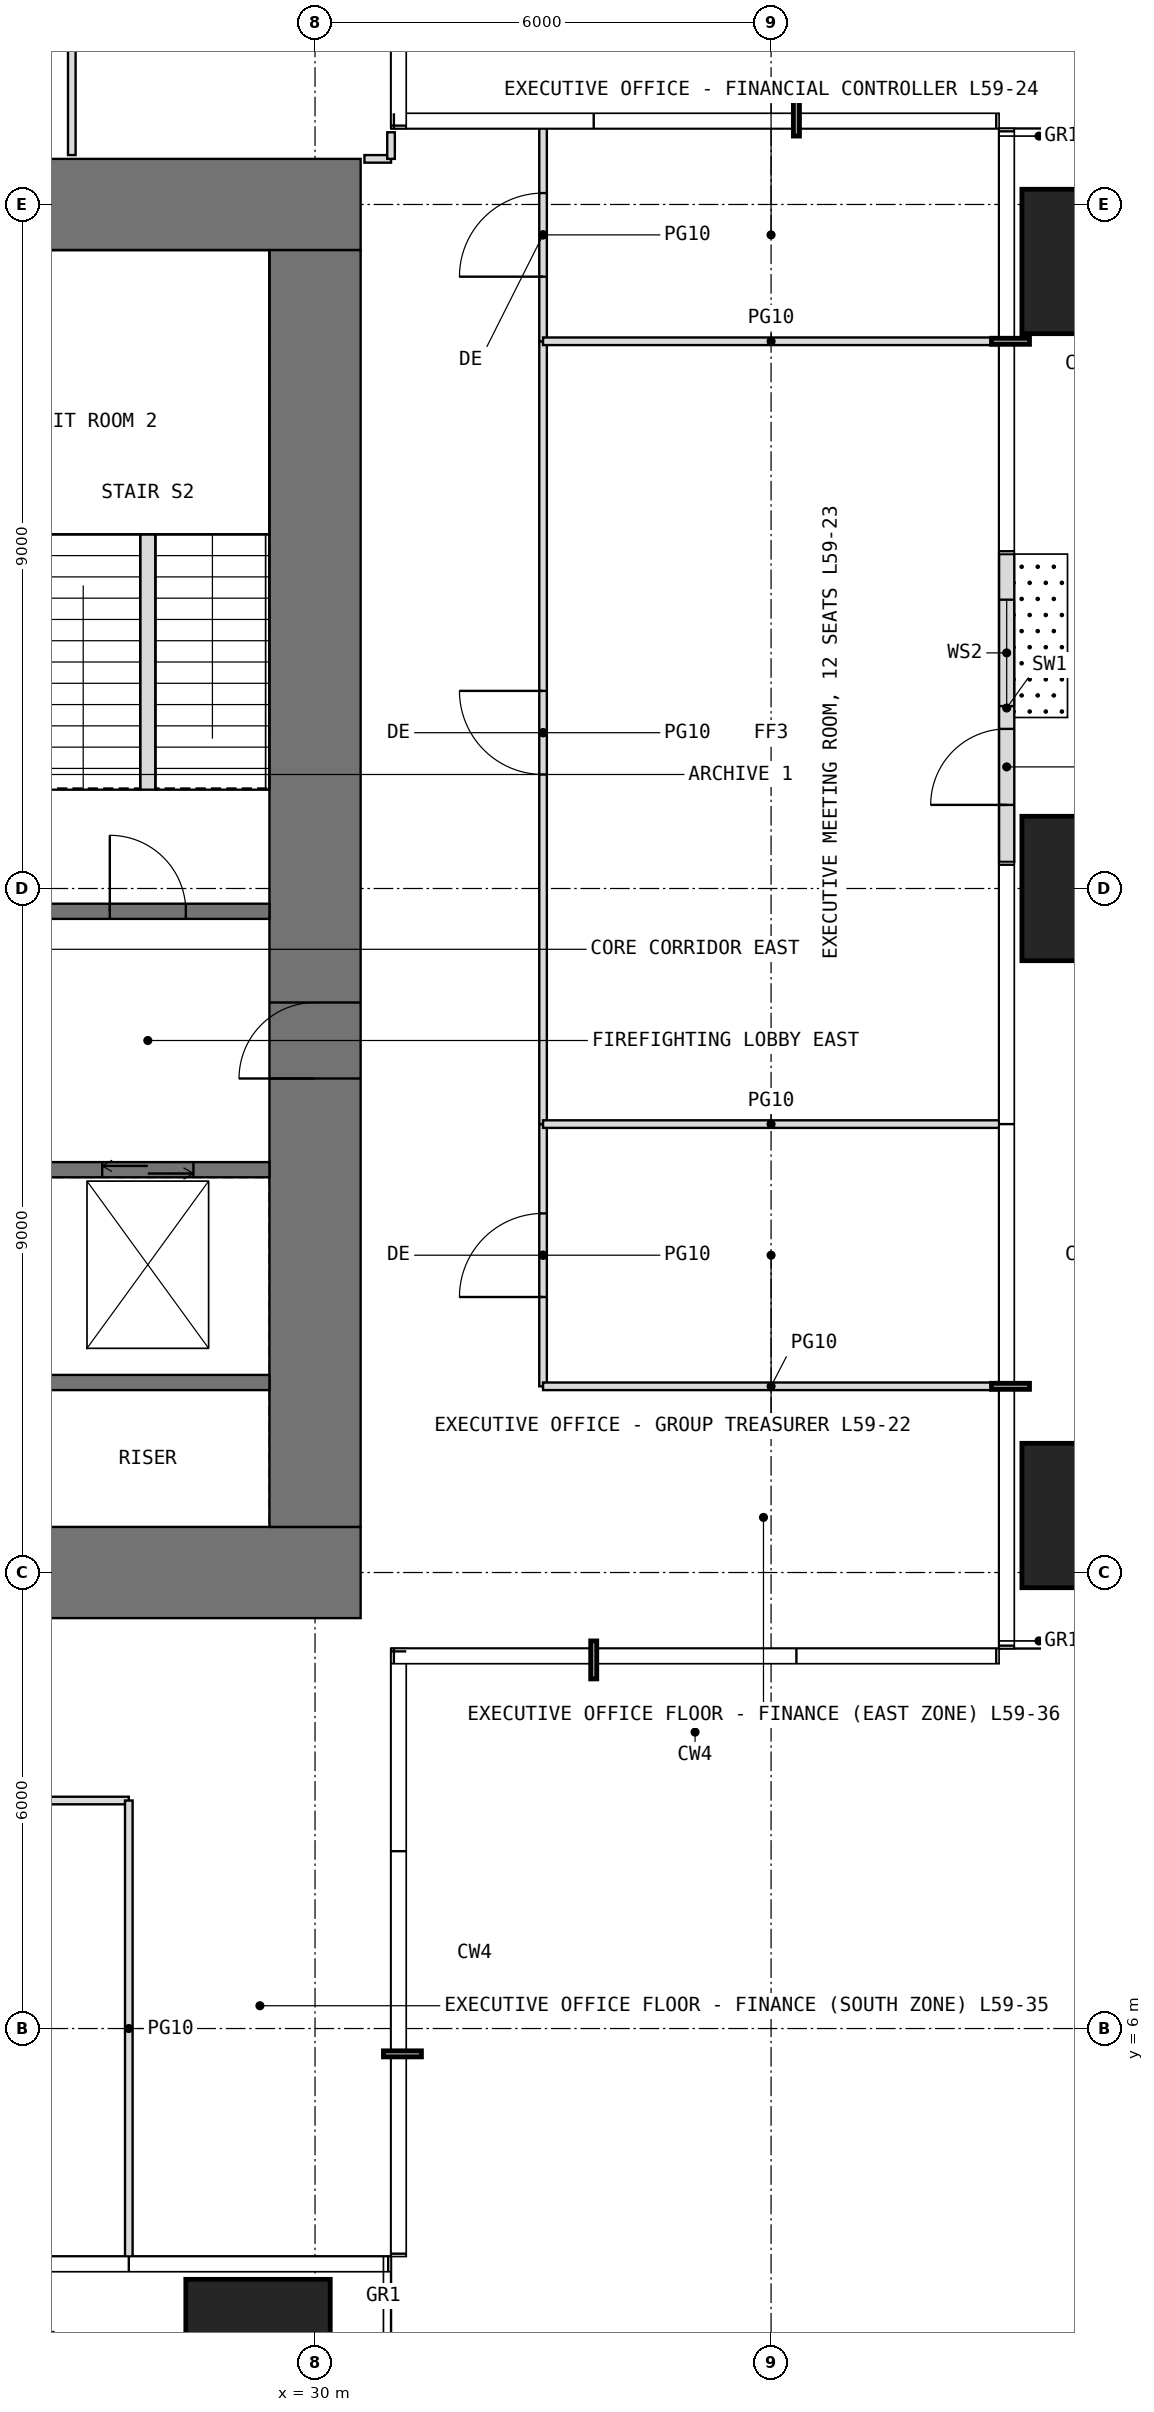
"""IFC4 building model, lengths in metres.
Left out: names, types, materials, properties, quantities, classifications, styles, units other than length and angle.
Written with IfcOpenShell. Run it as: python <this file> out.ifc"""

import sys

from ifc_helpers import new_model, si_unit, direction, frame, frame_2d, origin, origin_2d, place, context, subcontext, project, spatial, rectangle, extrude, element, fill, save


model = new_model("IFC4")
c1 = context("Model", 3, precision=1e-05, world=origin(), true_north=direction((0.0, 1.0)))
c2 = subcontext(c1, "Body", "Model", "MODEL_VIEW")
j1 = project(units=[si_unit("LENGTHUNIT", "METRE"), si_unit("PLANEANGLEUNIT", "RADIAN")], contexts=[c1])
p1 = place(None, origin())
s1 = spatial("IfcSite", under=j1, at=p1, CompositionType="ELEMENT")
p2 = place(p1, origin())
s2 = spatial("IfcBuilding", under=s1, at=p2, CompositionType="ELEMENT")
p3 = place(p2, frame((0.0, 0.0, 248.2)))
s3 = spatial("IfcBuildingStorey", under=s2, at=p3, CompositionType="ELEMENT", Elevation=248.2)
for number, where, z_axis, x_axis in (
    (1, (29.25, 1.75, 0.0), (0.0, 0.0, 1.0), (1.0, 0.0, 0.0)),
    (2, (40.25, 12.75, 0.0), (0.0, 0.0, 1.0), (1.0, 0.0, 0.0)),
    (3, (40.25, 21.0, 0.0), (0.0, 0.0, 1.0), (1.0, 0.0, 0.0)),
    (4, (40.25, 29.25, 0.0), (0.0, 0.0, 1.0), (1.0, 0.0, 0.0)),
):
    element("IfcColumn", number, at=place(p3, frame(where, z_axis=z_axis, x_axis=x_axis)), inside=s3, PredefinedType="COLUMN", context=c2, shape_type="SweptSolid", body=[
        extrude(rectangle(XDim=1.9, YDim=1.9, at=origin_2d()), origin(), (0.0, 0.0, 1.0), 4.2),
    ])
p4 = place(p3, frame((39.1, 21.35, 0.0), z_axis=(0.0, 0.0, 1.0), x_axis=(0.0, 1.0, 0.0)))
e5 = element("IfcWall", 5, at=p4, inside=s3, PredefinedType="USERDEFINED", context=c2, shape_type="SweptSolid", body=[
    extrude(rectangle(XDim=4.05, YDim=0.2, at=frame_2d((2.025, 0.0))), origin(), (0.0, 0.0, 1.0), 3.95),
])
p5 = place(p4, frame((0.75, 0.0, 0.0)))
e6 = element("IfcOpeningElement", 6, at=p5, cuts=e5, PredefinedType="OPENING", context=c2, shape_type="SweptSolid", body=[
    extrude(rectangle(XDim=1.0, YDim=2.4, at=frame_2d((0.5, 1.2))), frame((0.0, 0.11, 0.0), z_axis=(0.0, -1.0, 0.0), x_axis=(1.0, 0.0, 0.0)), (0.0, 0.0, 1.0), 0.22),
])
p6 = place(p4, frame((2.05, 0.0, 0.3)))
e7 = element("IfcOpeningElement", 7, at=p6, cuts=e5, PredefinedType="OPENING", context=c2, shape_type="SweptSolid", body=[
    extrude(rectangle(XDim=1.4, YDim=2.7, at=frame_2d((0.7, 1.35))), frame((0.0, 0.11, 0.0), z_axis=(0.0, -1.0, 0.0), x_axis=(1.0, 0.0, 0.0)), (0.0, 0.0, 1.0), 0.22),
])
p7 = place(p3, frame((11.4, 12.0, -0.05), z_axis=(0.0, 0.0, 1.0), x_axis=(1.0, 0.0, 0.0)))
e8 = element("IfcWall", 8, at=p7, inside=s3, PredefinedType="SHEAR", context=c2, shape_type="SweptSolid", body=[
    extrude(rectangle(XDim=19.2, YDim=1.2, at=frame_2d((9.6, 0.0))), origin(), (0.0, 0.0, 1.0), 4.2),
])
p8 = place(p7, frame((8.6, 0.0, 0.05)))
e9 = element("IfcOpeningElement", 9, at=p8, cuts=e8, PredefinedType="OPENING", context=c2, shape_type="SweptSolid", body=[
    extrude(rectangle(XDim=2.0, YDim=2.2, at=frame_2d((1.0, 1.1))), frame((0.0, 0.61, 0.0), z_axis=(0.0, -1.0, 0.0), x_axis=(1.0, 0.0, 0.0)), (0.0, 0.0, 1.0), 1.22),
])
p9 = place(p3, frame((11.4, 30.0, -0.05), z_axis=(0.0, 0.0, 1.0), x_axis=(1.0, 0.0, 0.0)))
e10 = element("IfcWall", 10, at=p9, inside=s3, PredefinedType="SHEAR", context=c2, shape_type="SweptSolid", body=[
    extrude(rectangle(XDim=19.2, YDim=1.2, at=frame_2d((9.6, 0.0))), origin(), (0.0, 0.0, 1.0), 4.2),
])
p10 = place(p9, frame((8.6, 0.0, 0.05)))
e11 = element("IfcOpeningElement", 11, at=p10, cuts=e10, PredefinedType="OPENING", context=c2, shape_type="SweptSolid", body=[
    extrude(rectangle(XDim=2.0, YDim=2.2, at=frame_2d((1.0, 1.1))), frame((0.0, 0.61, 0.0), z_axis=(0.0, -1.0, 0.0), x_axis=(1.0, 0.0, 0.0)), (0.0, 0.0, 1.0), 1.22),
])
p11 = place(p3, frame((30.0, 12.6, -0.05), z_axis=(0.0, 0.0, 1.0), x_axis=(0.0, 1.0, 0.0)))
e12 = element("IfcWall", 12, at=p11, inside=s3, PredefinedType="SHEAR", context=c2, shape_type="SweptSolid", body=[
    extrude(rectangle(XDim=16.8, YDim=1.2, at=frame_2d((8.4, 0.0))), origin(), (0.0, 0.0, 1.0), 4.2),
])
p12 = place(p11, frame((5.9, 0.0, 0.05)))
e13 = element("IfcOpeningElement", 13, at=p12, cuts=e12, PredefinedType="OPENING", context=c2, shape_type="SweptSolid", body=[
    extrude(rectangle(XDim=1.0, YDim=2.2, at=frame_2d((0.5, 1.1))), frame((0.0, 0.61, 0.0), z_axis=(0.0, -1.0, 0.0), x_axis=(1.0, 0.0, 0.0)), (0.0, 0.0, 1.0), 1.22),
])
p13 = place(p3, frame((26.2, 14.5, -0.05), z_axis=(0.0, 0.0, 1.0), x_axis=(1.0, 0.0, 0.0)))
e14 = element("IfcWall", 14, at=p13, inside=s3, PredefinedType="SHEAR", context=c2, shape_type="SweptSolid", body=[
    extrude(rectangle(XDim=3.2, YDim=0.2, at=frame_2d((1.6, 0.0))), origin(), (0.0, 0.0, 1.0), 4.2),
])
p14 = place(p3, frame((26.2, 17.3, -0.05), z_axis=(0.0, 0.0, 1.0), x_axis=(1.0, 0.0, 0.0)))
e15 = element("IfcWall", 15, at=p14, inside=s3, PredefinedType="SHEAR", context=c2, shape_type="SweptSolid", body=[
    extrude(rectangle(XDim=3.2, YDim=0.2, at=frame_2d((1.6, 0.0))), origin(), (0.0, 0.0, 1.0), 4.2),
])
p15 = place(p14, frame((1.0, 0.0, 0.05)))
e16 = element("IfcOpeningElement", 16, at=p15, cuts=e15, PredefinedType="OPENING", context=c2, shape_type="SweptSolid", body=[
    extrude(rectangle(XDim=1.2, YDim=2.2, at=frame_2d((0.6, 1.1))), frame((0.0, 0.11, 0.0), z_axis=(0.0, -1.0, 0.0), x_axis=(1.0, 0.0, 0.0)), (0.0, 0.0, 1.0), 0.22),
])
p16 = place(p3, frame((26.2, 20.7, -0.05), z_axis=(0.0, 0.0, 1.0), x_axis=(1.0, 0.0, 0.0)))
e17 = element("IfcWall", 17, at=p16, inside=s3, PredefinedType="SHEAR", context=c2, shape_type="SweptSolid", body=[
    extrude(rectangle(XDim=3.2, YDim=0.2, at=frame_2d((1.6, 0.0))), origin(), (0.0, 0.0, 1.0), 4.2),
])
p17 = place(p16, frame((1.1, 0.0, 0.05)))
e18 = element("IfcOpeningElement", 18, at=p17, cuts=e17, PredefinedType="OPENING", context=c2, shape_type="SweptSolid", body=[
    extrude(rectangle(XDim=1.0, YDim=2.2, at=frame_2d((0.5, 1.1))), frame((0.0, 0.11, 0.0), z_axis=(0.0, -1.0, 0.0), x_axis=(1.0, 0.0, 0.0)), (0.0, 0.0, 1.0), 0.22),
])
p18 = place(p3, frame((24.1, 9.0, 0.0), z_axis=(0.0, 0.0, 1.0), x_axis=(1.0, 0.0, 0.0)))
e19 = element("IfcWall", 19, at=p18, inside=s3, PredefinedType="PARTITIONING", context=c2, shape_type="SweptSolid", body=[
    extrude(rectangle(XDim=3.45, YDim=0.1, at=frame_2d((1.725, 0.0))), origin(), (0.0, 0.0, 1.0), 3.95),
])
p19 = place(p18, frame((1.175, 0.0, 0.0)))
e20 = element("IfcOpeningElement", 20, at=p19, cuts=e19, PredefinedType="OPENING", context=c2, shape_type="SweptSolid", body=[
    extrude(rectangle(XDim=1.1, YDim=2.3, at=frame_2d((0.55, 1.15))), frame((0.0, 0.06, 0.0), z_axis=(0.0, -1.0, 0.0), x_axis=(1.0, 0.0, 0.0)), (0.0, 0.0, 1.0), 0.12),
])
p20 = place(p3, frame((26.8, 30.65, 0.0), z_axis=(0.0, 0.0, 1.0), x_axis=(0.0, 1.0, 0.0)))
e21 = element("IfcWall", 21, at=p20, inside=s3, PredefinedType="PARTITIONING", context=c2, shape_type="SweptSolid", body=[
    extrude(rectangle(XDim=3.45, YDim=0.1, at=frame_2d((1.725, 0.0))), origin(), (0.0, 0.0, 1.0), 3.95),
])
p21 = place(p3, frame((27.55, 3.0, 0.0), z_axis=(0.0, 0.0, 1.0), x_axis=(0.0, 1.0, 0.0)))
e22 = element("IfcWall", 22, at=p21, inside=s3, PredefinedType="PARTITIONING", context=c2, shape_type="SweptSolid", body=[
    extrude(rectangle(XDim=6.0, YDim=0.1, at=frame_2d((3.0, 0.0))), origin(), (0.0, 0.0, 1.0), 3.95),
])
p22 = place(p3, frame((30.65, 30.6, 0.0), z_axis=(0.0, 0.0, 1.0), x_axis=(1.0, 0.0, 0.0)))
e23 = element("IfcWall", 23, at=p22, inside=s3, PredefinedType="PARTITIONING", context=c2, shape_type="SweptSolid", body=[
    extrude(rectangle(XDim=0.35, YDim=0.1, at=frame_2d((0.175, 0.0))), origin(), (0.0, 0.0, 1.0), 3.95),
])
p23 = place(p3, frame((31.0, 30.6, 0.0), z_axis=(0.0, 0.0, 1.0), x_axis=(0.0, 1.0, 0.0)))
e24 = element("IfcWall", 24, at=p23, inside=s3, PredefinedType="PARTITIONING", context=c2, shape_type="SweptSolid", body=[
    extrude(rectangle(XDim=0.35, YDim=0.1, at=frame_2d((0.175, 0.0))), origin(), (0.0, 0.0, 1.0), 3.95),
])
p24 = place(p3, frame((33.0, 14.45, 0.0), z_axis=(0.0, 0.0, 1.0), x_axis=(0.0, 1.0, 0.0)))
e25 = element("IfcWall", 25, at=p24, inside=s3, PredefinedType="PARTITIONING", context=c2, shape_type="SweptSolid", body=[
    extrude(rectangle(XDim=3.45, YDim=0.1, at=frame_2d((1.725, 0.0))), origin(), (0.0, 0.0, 1.0), 3.95),
])
p25 = place(p24, frame((1.175, 0.0, 0.0)))
e26 = element("IfcOpeningElement", 26, at=p25, cuts=e25, PredefinedType="OPENING", context=c2, shape_type="SweptSolid", body=[
    extrude(rectangle(XDim=1.1, YDim=2.3, at=frame_2d((0.55, 1.15))), frame((0.0, 0.06, 0.0), z_axis=(0.0, -1.0, 0.0), x_axis=(1.0, 0.0, 0.0)), (0.0, 0.0, 1.0), 0.12),
])
p26 = place(p3, frame((33.0, 14.45, 0.0), z_axis=(0.0, 0.0, 1.0), x_axis=(1.0, 0.0, 0.0)))
e27 = element("IfcWall", 27, at=p26, inside=s3, PredefinedType="PARTITIONING", context=c2, shape_type="SweptSolid", body=[
    extrude(rectangle(XDim=6.0, YDim=0.1, at=frame_2d((3.0, 0.0))), origin(), (0.0, 0.0, 1.0), 3.95),
])
p27 = place(p3, frame((33.0, 17.9, 0.0), z_axis=(0.0, 0.0, 1.0), x_axis=(0.0, 1.0, 0.0)))
e28 = element("IfcWall", 28, at=p27, inside=s3, PredefinedType="PARTITIONING", context=c2, shape_type="SweptSolid", body=[
    extrude(rectangle(XDim=10.3, YDim=0.1, at=frame_2d((5.15, 0.0))), origin(), (0.0, 0.0, 1.0), 3.95),
])
p28 = place(p27, frame((4.6, 0.0, 0.0)))
e29 = element("IfcOpeningElement", 29, at=p28, cuts=e28, PredefinedType="OPENING", context=c2, shape_type="SweptSolid", body=[
    extrude(rectangle(XDim=1.1, YDim=2.3, at=frame_2d((0.55, 1.15))), frame((0.0, 0.06, 0.0), z_axis=(0.0, -1.0, 0.0), x_axis=(1.0, 0.0, 0.0)), (0.0, 0.0, 1.0), 0.12),
])
p29 = place(p3, frame((33.0, 17.9, 0.0), z_axis=(0.0, 0.0, 1.0), x_axis=(1.0, 0.0, 0.0)))
e30 = element("IfcWall", 30, at=p29, inside=s3, PredefinedType="PARTITIONING", context=c2, shape_type="SweptSolid", body=[
    extrude(rectangle(XDim=6.0, YDim=0.1, at=frame_2d((3.0, 0.0))), origin(), (0.0, 0.0, 1.0), 3.95),
])
p30 = place(p3, frame((33.0, 28.2, 0.0), z_axis=(0.0, 0.0, 1.0), x_axis=(0.0, 1.0, 0.0)))
e31 = element("IfcWall", 31, at=p30, inside=s3, PredefinedType="PARTITIONING", context=c2, shape_type="SweptSolid", body=[
    extrude(rectangle(XDim=2.8, YDim=0.1, at=frame_2d((1.4, 0.0))), origin(), (0.0, 0.0, 1.0), 3.95),
])
p31 = place(p30, frame((0.85, 0.0, 0.0)))
e32 = element("IfcOpeningElement", 32, at=p31, cuts=e31, PredefinedType="OPENING", context=c2, shape_type="SweptSolid", body=[
    extrude(rectangle(XDim=1.1, YDim=2.3, at=frame_2d((0.55, 1.15))), frame((0.0, 0.06, 0.0), z_axis=(0.0, -1.0, 0.0), x_axis=(1.0, 0.0, 0.0)), (0.0, 0.0, 1.0), 0.12),
])
p32 = place(p3, frame((33.0, 28.2, 0.0), z_axis=(0.0, 0.0, 1.0), x_axis=(1.0, 0.0, 0.0)))
e33 = element("IfcWall", 33, at=p32, inside=s3, PredefinedType="PARTITIONING", context=c2, shape_type="SweptSolid", body=[
    extrude(rectangle(XDim=6.0, YDim=0.1, at=frame_2d((3.0, 0.0))), origin(), (0.0, 0.0, 1.0), 3.95),
])
p33 = place(p3, frame((27.8, 22.3, 0.0), z_axis=(0.0, 0.0, 1.0), x_axis=(0.0, 1.0, 0.0)))
e34 = element("IfcWall", 34, at=p33, inside=s3, PredefinedType="PARTITIONING", context=c2, shape_type="SweptSolid", body=[
    extrude(rectangle(XDim=3.36, YDim=0.2, at=frame_2d((1.68, 0.0))), origin(), (0.0, 0.0, 1.0), 4.2),
])
p34 = place(p5, origin())
e35 = element("IfcDoor", 35, at=p34, inside=s3, OperationType="SINGLE_SWING_LEFT", PredefinedType="DOOR", context=c2, shape_type="SweptSolid", body=[
    extrude(rectangle(XDim=1.0, YDim=2.4, at=frame_2d((0.5, 1.2))), frame((0.0, 0.025, 0.0), z_axis=(0.0, -1.0, 0.0), x_axis=(1.0, 0.0, 0.0)), (0.0, 0.0, 1.0), 0.05),
])
fill(e6, e35)
p35 = place(p6, origin())
e36 = element("IfcWindow", 36, at=p35, inside=s3, PartitioningType="SINGLE_PANEL", PredefinedType="WINDOW", context=c2, shape_type="SweptSolid", body=[
    extrude(rectangle(XDim=1.4, YDim=2.7, at=frame_2d((0.7, 1.35))), frame((0.0, 0.03, 0.0), z_axis=(0.0, -1.0, 0.0), x_axis=(1.0, 0.0, 0.0)), (0.0, 0.0, 1.0), 0.06),
])
fill(e7, e36)
p36 = place(p12, origin())
e37 = element("IfcDoor", 37, at=p36, inside=s3, OperationType="SINGLE_SWING_LEFT", PredefinedType="DOOR", context=c2, shape_type="SweptSolid", body=[
    extrude(rectangle(XDim=1.0, YDim=2.2, at=frame_2d((0.5, 1.1))), frame((0.0, 0.025, 0.0), z_axis=(0.0, -1.0, 0.0), x_axis=(1.0, 0.0, 0.0)), (0.0, 0.0, 1.0), 0.05),
])
fill(e13, e37)
p37 = place(p17, origin())
e38 = element("IfcDoor", 38, at=p37, inside=s3, OperationType="SINGLE_SWING_LEFT", PredefinedType="DOOR", context=c2, shape_type="SweptSolid", body=[
    extrude(rectangle(XDim=1.0, YDim=2.2, at=frame_2d((0.5, 1.1))), frame((0.0, 0.025, 0.0), z_axis=(0.0, -1.0, 0.0), x_axis=(1.0, 0.0, 0.0)), (0.0, 0.0, 1.0), 0.05),
])
fill(e18, e38)
p38 = place(p25, origin())
e39 = element("IfcDoor", 39, at=p38, inside=s3, OperationType="SINGLE_SWING_LEFT", PredefinedType="DOOR", context=c2, shape_type="SweptSolid", body=[
    extrude(rectangle(XDim=1.1, YDim=2.3, at=frame_2d((0.55, 1.15))), frame((0.0, 0.025, 0.0), z_axis=(0.0, -1.0, 0.0), x_axis=(1.0, 0.0, 0.0)), (0.0, 0.0, 1.0), 0.05),
])
fill(e26, e39)
p39 = place(p28, origin())
e40 = element("IfcDoor", 40, at=p39, inside=s3, OperationType="SINGLE_SWING_RIGHT", PredefinedType="DOOR", context=c2, shape_type="SweptSolid", body=[
    extrude(rectangle(XDim=1.1, YDim=2.3, at=frame_2d((0.55, 1.15))), frame((0.0, 0.025, 0.0), z_axis=(0.0, -1.0, 0.0), x_axis=(1.0, 0.0, 0.0)), (0.0, 0.0, 1.0), 0.05),
])
fill(e29, e40)
p40 = place(p31, origin())
e41 = element("IfcDoor", 41, at=p40, inside=s3, OperationType="SINGLE_SWING_LEFT", PredefinedType="DOOR", context=c2, shape_type="SweptSolid", body=[
    extrude(rectangle(XDim=1.1, YDim=2.3, at=frame_2d((0.55, 1.15))), frame((0.0, 0.025, 0.0), z_axis=(0.0, -1.0, 0.0), x_axis=(1.0, 0.0, 0.0)), (0.0, 0.0, 1.0), 0.05),
])
fill(e32, e41)
p41 = place(p15, origin())
e42 = element("IfcDoor", 42, at=p41, inside=s3, OperationType="DOUBLE_DOOR_SLIDING", PredefinedType="DOOR", context=c2, shape_type="SweptSolid", body=[
    extrude(rectangle(XDim=1.2, YDim=2.2, at=frame_2d((0.6, 1.1))), frame((0.0, 0.025, 0.0), z_axis=(0.0, -1.0, 0.0), x_axis=(1.0, 0.0, 0.0)), (0.0, 0.0, 1.0), 0.05),
])
fill(e16, e42)
save(model, sys.argv[1])
